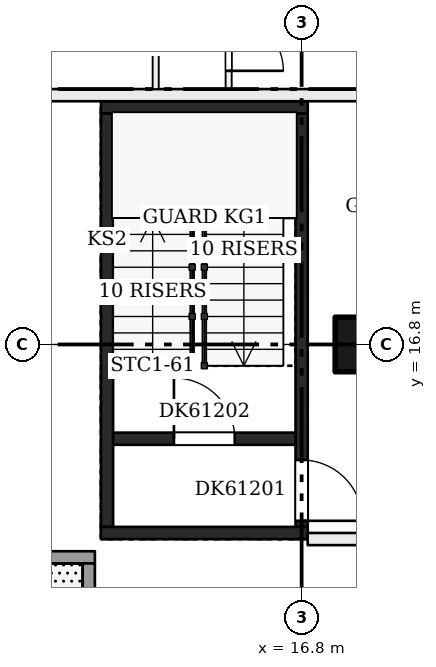
"""IFC4 building model, lengths in metres.
Left out: names, types, materials, properties, quantities, classifications, styles, units other than length and angle.
Written with IfcOpenShell. Run it as: python <this file> out.ifc"""

import sys

from ifc_helpers import new_model, si_unit, direction, frame, frame_2d, origin, origin_2d, place, context, subcontext, project, spatial, rectangle, extrude, element, fill, save


model = new_model("IFC4")
c1 = context("Model", 3, precision=1e-05, world=origin(), true_north=direction((0.0, 1.0)))
c2 = subcontext(c1, "Body", "Model", "MODEL_VIEW")
j1 = project(units=[si_unit("LENGTHUNIT", "METRE"), si_unit("PLANEANGLEUNIT", "RADIAN")], contexts=[c1])
p1 = place(None, origin())
s1 = spatial("IfcSite", under=j1, at=p1, CompositionType="ELEMENT")
p2 = place(p1, origin())
s2 = spatial("IfcBuilding", under=s1, at=p2, CompositionType="ELEMENT")
p3 = place(p2, frame((0.0, 0.0, 235.2)))
s3 = spatial("IfcBuildingStorey", under=s2, at=p3, CompositionType="ELEMENT", Elevation=235.2)
p4 = place(p3, frame((17.8, 16.8, 0.0), z_axis=(0.0, 0.0, 1.0), x_axis=(1.0, 0.0, 0.0)))
e1 = element("IfcColumn", 1, at=p4, inside=s3, PredefinedType="COLUMN", context=c2, shape_type="SweptSolid", body=[
    extrude(rectangle(XDim=0.9, YDim=0.9, at=origin_2d()), origin(), (0.0, 0.0, 1.0), 3.22),
])
p5 = place(p3, frame((13.6, 13.8, 0.0), z_axis=(0.0, 0.0, 1.0), x_axis=(0.0, 1.0, 0.0)))
e2 = element("IfcWall", 2, at=p5, inside=s3, PredefinedType="SHEAR", context=c2, shape_type="SweptSolid", body=[
    extrude(rectangle(XDim=6.8, YDim=0.2, at=frame_2d((3.4, 0.0))), origin(), (0.0, 0.0, 1.0), 3.22),
])
p6 = place(p3, frame((16.8, 13.8, 0.0), z_axis=(0.0, 0.0, 1.0), x_axis=(0.0, 1.0, 0.0)))
e3 = element("IfcWall", 3, at=p6, inside=s3, PredefinedType="SHEAR", context=c2, shape_type="SweptSolid", body=[
    extrude(rectangle(XDim=6.8, YDim=0.2, at=frame_2d((3.4, 0.0))), origin(), (0.0, 0.0, 1.0), 3.22),
])
p7 = place(p6, frame((0.1, 0.0, 0.0)))
e4 = element("IfcOpeningElement", 4, at=p7, cuts=e3, PredefinedType="OPENING", context=c2, shape_type="SweptSolid", body=[
    extrude(rectangle(XDim=1.0, YDim=2.1, at=frame_2d((0.5, 1.05))), frame((0.0, 0.11, 0.0), z_axis=(0.0, -1.0, 0.0), x_axis=(1.0, 0.0, 0.0)), (0.0, 0.0, 1.0), 0.22),
])
for number, where, z_axis, x_axis in (
    (5, (13.5, 13.7, 0.0), (0.0, 0.0, 1.0), (1.0, 0.0, 0.0)),
    (6, (13.5, 20.7, 0.0), (0.0, 0.0, 1.0), (1.0, 0.0, 0.0)),
):
    element("IfcWall", number, at=place(p3, frame(where, z_axis=z_axis, x_axis=x_axis)), inside=s3, PredefinedType="SHEAR", context=c2, shape_type="SweptSolid", body=[
        extrude(rectangle(XDim=3.4, YDim=0.2, at=frame_2d((1.7, 0.0))), origin(), (0.0, 0.0, 1.0), 3.22),
    ])
p8 = place(p3, frame((13.7, 15.25, 0.0), z_axis=(0.0, 0.0, 1.0), x_axis=(1.0, 0.0, 0.0)))
e7 = element("IfcWall", 7, at=p8, inside=s3, PredefinedType="SHEAR", context=c2, shape_type="SweptSolid", body=[
    extrude(rectangle(XDim=3.0, YDim=0.2, at=frame_2d((1.5, 0.0))), origin(), (0.0, 0.0, 1.0), 3.22),
])
p9 = place(p8, frame((1.0, 0.0, 0.0)))
e8 = element("IfcOpeningElement", 8, at=p9, cuts=e7, PredefinedType="OPENING", context=c2, shape_type="SweptSolid", body=[
    extrude(rectangle(XDim=1.0, YDim=2.1, at=frame_2d((0.5, 1.05))), frame((0.0, 0.11, 0.0), z_axis=(0.0, -1.0, 0.0), x_axis=(1.0, 0.0, 0.0)), (0.0, 0.0, 1.0), 0.22),
])
p10 = place(p3, frame((16.9, 13.6, 0.0), z_axis=(0.0, 0.0, 1.0), x_axis=(1.0, 0.0, 0.0)))
e9 = element("IfcWall", 9, at=p10, inside=s3, PredefinedType="PARTITIONING", context=c2, shape_type="SweptSolid", body=[
    extrude(rectangle(XDim=4.2, YDim=0.2, at=frame_2d((2.1, 0.0))), origin(), (0.0, 0.0, 1.0), 3.22),
])
p11 = place(p10, frame((1.6, 0.0, 0.0)))
e10 = element("IfcOpeningElement", 10, at=p11, cuts=e9, PredefinedType="OPENING", context=c2, shape_type="SweptSolid", body=[
    extrude(rectangle(XDim=1.0, YDim=2.1, at=frame_2d((0.5, 1.05))), frame((0.0, 0.11, 0.0), z_axis=(0.0, -1.0, 0.0), x_axis=(1.0, 0.0, 0.0)), (0.0, 0.0, 1.0), 0.22),
])
p12 = place(p3, frame((10.9, 20.9, 0.0), z_axis=(0.0, 0.0, 1.0), x_axis=(1.0, 0.0, 0.0)))
e11 = element("IfcWall", 11, at=p12, inside=s3, PredefinedType="PARTITIONING", context=c2, shape_type="SweptSolid", body=[
    extrude(rectangle(XDim=8.3, YDim=0.2, at=frame_2d((4.15, 0.0))), origin(), (0.0, 0.0, 1.0), 3.22),
])
p13 = place(p3, frame((14.4, 21.0, 0.0), z_axis=(0.0, 0.0, 1.0), x_axis=(0.0, 1.0, 0.0)))
e12 = element("IfcWall", 12, at=p13, inside=s3, PredefinedType="PARTITIONING", context=c2, shape_type="SweptSolid", body=[
    extrude(rectangle(XDim=19.0, YDim=0.1, at=frame_2d((9.5, 0.0))), origin(), (0.0, 0.0, 1.0), 3.22),
])
p14 = place(p13, frame((1.6, 0.0, 0.0)))
e13 = element("IfcOpeningElement", 13, at=p14, cuts=e12, PredefinedType="OPENING", context=c2, shape_type="SweptSolid", body=[
    extrude(rectangle(XDim=0.9, YDim=2.1, at=frame_2d((0.45, 1.05))), frame((0.0, 0.06, 0.0), z_axis=(0.0, -1.0, 0.0), x_axis=(1.0, 0.0, 0.0)), (0.0, 0.0, 1.0), 0.12),
])
p15 = place(p13, frame((11.2, 0.0, 0.0)))
e14 = element("IfcOpeningElement", 14, at=p15, cuts=e12, PredefinedType="OPENING", context=c2, shape_type="SweptSolid", body=[
    extrude(rectangle(XDim=0.9, YDim=2.1, at=frame_2d((0.45, 1.05))), frame((0.0, 0.06, 0.0), z_axis=(0.0, -1.0, 0.0), x_axis=(1.0, 0.0, 0.0)), (0.0, 0.0, 1.0), 0.12),
])
p16 = place(p3, frame((15.6, 21.0, 0.0), z_axis=(0.0, 0.0, 1.0), x_axis=(0.0, 1.0, 0.0)))
e15 = element("IfcWall", 15, at=p16, inside=s3, PredefinedType="PARTITIONING", context=c2, shape_type="SweptSolid", body=[
    extrude(rectangle(XDim=19.0, YDim=0.1, at=frame_2d((9.5, 0.0))), origin(), (0.0, 0.0, 1.0), 3.22),
])
p17 = place(p16, frame((2.9, 0.0, 0.0)))
e16 = element("IfcOpeningElement", 16, at=p17, cuts=e15, PredefinedType="OPENING", context=c2, shape_type="SweptSolid", body=[
    extrude(rectangle(XDim=0.9, YDim=2.1, at=frame_2d((0.45, 1.05))), frame((0.0, 0.06, 0.0), z_axis=(0.0, -1.0, 0.0), x_axis=(1.0, 0.0, 0.0)), (0.0, 0.0, 1.0), 0.12),
])
p18 = place(p16, frame((0.3, 0.0, 0.0)))
e17 = element("IfcOpeningElement", 17, at=p18, cuts=e15, PredefinedType="OPENING", context=c2, shape_type="SweptSolid", body=[
    extrude(rectangle(XDim=0.9, YDim=2.1, at=frame_2d((0.45, 1.05))), frame((0.0, 0.06, 0.0), z_axis=(0.0, -1.0, 0.0), x_axis=(1.0, 0.0, 0.0)), (0.0, 0.0, 1.0), 0.12),
])
p19 = place(p16, frame((6.02, 0.0, 0.0)))
e18 = element("IfcOpeningElement", 18, at=p19, cuts=e15, PredefinedType="OPENING", context=c2, shape_type="SweptSolid", body=[
    extrude(rectangle(XDim=0.9, YDim=2.1, at=frame_2d((0.45, 1.05))), frame((0.0, 0.06, 0.0), z_axis=(0.0, -1.0, 0.0), x_axis=(1.0, 0.0, 0.0)), (0.0, 0.0, 1.0), 0.12),
])
p20 = place(p16, frame((9.54, 0.0, 0.0)))
e19 = element("IfcOpeningElement", 19, at=p20, cuts=e15, PredefinedType="OPENING", context=c2, shape_type="SweptSolid", body=[
    extrude(rectangle(XDim=0.9, YDim=2.1, at=frame_2d((0.45, 1.05))), frame((0.0, 0.06, 0.0), z_axis=(0.0, -1.0, 0.0), x_axis=(1.0, 0.0, 0.0)), (0.0, 0.0, 1.0), 0.12),
])
p21 = place(p16, frame((13.36, 0.0, 0.0)))
e20 = element("IfcOpeningElement", 20, at=p21, cuts=e15, PredefinedType="OPENING", context=c2, shape_type="SweptSolid", body=[
    extrude(rectangle(XDim=0.9, YDim=2.1, at=frame_2d((0.45, 1.05))), frame((0.0, 0.06, 0.0), z_axis=(0.0, -1.0, 0.0), x_axis=(1.0, 0.0, 0.0)), (0.0, 0.0, 1.0), 0.12),
])
p22 = place(p16, frame((16.88, 0.0, 0.0)))
e21 = element("IfcOpeningElement", 21, at=p22, cuts=e15, PredefinedType="OPENING", context=c2, shape_type="SweptSolid", body=[
    extrude(rectangle(XDim=0.9, YDim=2.1, at=frame_2d((0.45, 1.05))), frame((0.0, 0.06, 0.0), z_axis=(0.0, -1.0, 0.0), x_axis=(1.0, 0.0, 0.0)), (0.0, 0.0, 1.0), 0.12),
])
p23 = place(p3, frame((10.8, 13.3, 0.0), z_axis=(0.0, 0.0, 1.0), x_axis=(1.0, 0.0, 0.0)))
e22 = element("IfcWall", 22, at=p23, inside=s3, PredefinedType="SOLIDWALL", context=c2, shape_type="SweptSolid", body=[
    extrude(rectangle(XDim=2.6, YDim=0.2, at=frame_2d((1.3, 0.0))), origin(), (0.0, 0.0, 1.0), 3.22),
])
p24 = place(p3, frame((13.3, 13.2, 0.0), z_axis=(0.0, 0.0, 1.0), x_axis=(0.0, -1.0, 0.0)))
e23 = element("IfcWall", 23, at=p24, inside=s3, PredefinedType="SOLIDWALL", context=c2, shape_type="SweptSolid", body=[
    extrude(rectangle(XDim=2.2, YDim=0.2, at=frame_2d((1.1, 0.0))), origin(), (0.0, 0.0, 1.0), 3.22),
])
p25 = place(p7, frame((1.0, 0.0, 0.0), z_axis=(0.0, 0.0, 1.0), x_axis=(-1.0, 0.0, 0.0)))
e24 = element("IfcDoor", 24, at=p25, inside=s3, OperationType="SINGLE_SWING_RIGHT", PredefinedType="DOOR", context=c2, shape_type="SweptSolid", body=[
    extrude(rectangle(XDim=1.0, YDim=2.1, at=frame_2d((0.5, 1.05))), frame((0.0, 0.025, 0.0), z_axis=(0.0, -1.0, 0.0), x_axis=(1.0, 0.0, 0.0)), (0.0, 0.0, 1.0), 0.05),
])
fill(e4, e24)
p26 = place(p9, origin())
e25 = element("IfcDoor", 25, at=p26, inside=s3, OperationType="SINGLE_SWING_LEFT", PredefinedType="DOOR", context=c2, shape_type="SweptSolid", body=[
    extrude(rectangle(XDim=1.0, YDim=2.1, at=frame_2d((0.5, 1.05))), frame((0.0, 0.025, 0.0), z_axis=(0.0, -1.0, 0.0), x_axis=(1.0, 0.0, 0.0)), (0.0, 0.0, 1.0), 0.05),
])
fill(e8, e25)
p27 = place(p18, frame((0.9, 0.0, 0.0), z_axis=(0.0, 0.0, 1.0), x_axis=(-1.0, 0.0, 0.0)))
e26 = element("IfcDoor", 26, at=p27, inside=s3, OperationType="SINGLE_SWING_RIGHT", PredefinedType="DOOR", context=c2, shape_type="SweptSolid", body=[
    extrude(rectangle(XDim=0.9, YDim=2.1, at=frame_2d((0.45, 1.05))), frame((0.0, 0.025, 0.0), z_axis=(0.0, -1.0, 0.0), x_axis=(1.0, 0.0, 0.0)), (0.0, 0.0, 1.0), 0.05),
])
fill(e17, e26)
save(model, sys.argv[1])
